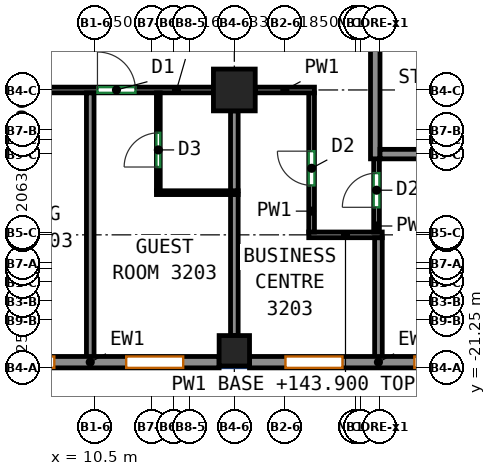
"""IFC4 building model, lengths in metres.
Left out: names, types, materials, properties, quantities, classifications, styles, units other than length and angle.
Written with IfcOpenShell. Run it as: python <this file> out.ifc"""

import sys

from ifc_helpers import new_model, si_unit, direction, frame, frame_2d, origin, origin_2d, place, context, subcontext, project, spatial, rectangle, extrude, source, transform, mapped, element, fill, save


model = new_model("IFC4")
c1 = context("Model", 3, precision=1e-05, world=origin(), true_north=direction((0.0, 1.0)))
c2 = subcontext(c1, "Body", "Model", "MODEL_VIEW")
j1 = project(units=[si_unit("LENGTHUNIT", "METRE"), si_unit("PLANEANGLEUNIT", "RADIAN")], contexts=[c1])
p1 = place(None, origin())
s1 = spatial("IfcSite", under=j1, at=p1, CompositionType="ELEMENT")
p2 = place(p1, origin())
s2 = spatial("IfcBuilding", under=s1, at=p2, CompositionType="ELEMENT")
p3 = place(p2, frame((0.0, 0.0, 143.9)))
s3 = spatial("IfcBuildingStorey", under=s2, at=p3, CompositionType="ELEMENT", Elevation=143.9)
m1 = source(origin(), c2, "Body", "SweptSolid", [
    extrude(rectangle(XDim=0.8, YDim=0.8, at=origin_2d()), origin(), (0.0, 0.0, 1.0), 3.12),
])
p4 = place(p3, frame((14.167, -20.8, 0.0), z_axis=(0.0, 0.0, 1.0), x_axis=(1.0, 0.0, 0.0)))
e1 = element("IfcColumn", 1, at=p4, inside=s3, PredefinedType="COLUMN", context=c2, shape_type="MappedRepresentation", body=[
    mapped(m1, transform((0.0, 0.0, 0.0))),
])
m2 = source(origin(), c2, "Body", "SweptSolid", [
    extrude(rectangle(XDim=1.1, YDim=1.1, at=origin_2d()), origin(), (0.0, 0.0, 1.0), 3.12),
])
p5 = place(p3, frame((14.167, -13.938, 0.0), z_axis=(0.0, 0.0, 1.0), x_axis=(1.0, 0.0, 0.0)))
e2 = element("IfcColumn", 2, at=p5, inside=s3, PredefinedType="COLUMN", context=c2, shape_type="MappedRepresentation", body=[
    mapped(m2, transform((0.0, 0.0, 0.0))),
])
m3 = source(origin(), c2, "Body", "SweptSolid", [
    extrude(rectangle(XDim=8.0, YDim=0.25, at=frame_2d((4.0, 0.0))), origin(), (0.0, 0.0, 1.0), 3.12),
])
p6 = place(p3, frame((17.875, -15.75, 0.0), z_axis=(0.0, 0.0, 1.0), x_axis=(0.0, 1.0, 0.0)))
e3 = element("IfcWall", 3, at=p6, inside=s3, PredefinedType="SHEAR", context=c2, shape_type="MappedRepresentation", body=[
    mapped(m3, transform((0.0, 0.0, 0.0))),
])
m4 = source(origin(), c2, "Body", "SweptSolid", [
    extrude(rectangle(XDim=3.7, YDim=0.25, at=frame_2d((1.85, 0.0))), origin(), (0.0, 0.0, 1.0), 3.12),
])
p7 = place(p3, frame((18.0, -15.625, 0.0), z_axis=(0.0, 0.0, 1.0), x_axis=(1.0, 0.0, 0.0)))
e4 = element("IfcWall", 4, at=p7, inside=s3, PredefinedType="SHEAR", context=c2, shape_type="MappedRepresentation", body=[
    mapped(m4, transform((0.0, 0.0, 0.0))),
])
m5 = source(origin(), c2, "Body", "SweptSolid", [
    extrude(rectangle(XDim=6.783, YDim=0.3, at=frame_2d((3.392, 0.0))), origin(), (0.0, 0.0, 1.0), 3.12),
])
p8 = place(p3, frame((6.983, -21.1, 0.0), z_axis=(0.0, 0.0, 1.0), x_axis=(1.0, 0.0, 0.0)))
e5 = element("IfcWall", 5, at=p8, inside=s3, PredefinedType="SOLIDWALL", context=c2, shape_type="MappedRepresentation", body=[
    mapped(m5, transform((0.0, 0.0, 0.0))),
])
p9 = place(p8, frame((0.946, 0.0, 0.85)))
e6 = element("IfcOpeningElement", 6, at=p9, cuts=e5, PredefinedType="OPENING", context=c2, shape_type="SweptSolid", body=[
    extrude(rectangle(XDim=1.5, YDim=1.95, at=frame_2d((0.75, 0.975))), frame((0.0, 0.16, 0.0), z_axis=(0.0, -1.0, 0.0), x_axis=(1.0, 0.0, 0.0)), (0.0, 0.0, 1.0), 0.32),
])
p10 = place(p8, frame((4.338, 0.0, 0.85)))
e7 = element("IfcOpeningElement", 7, at=p10, cuts=e5, PredefinedType="OPENING", context=c2, shape_type="SweptSolid", body=[
    extrude(rectangle(XDim=1.5, YDim=1.95, at=frame_2d((0.75, 0.975))), frame((0.0, 0.16, 0.0), z_axis=(0.0, -1.0, 0.0), x_axis=(1.0, 0.0, 0.0)), (0.0, 0.0, 1.0), 0.32),
])
m6 = source(origin(), c2, "Body", "SweptSolid", [
    extrude(rectangle(XDim=6.783, YDim=0.3, at=frame_2d((3.392, 0.0))), origin(), (0.0, 0.0, 1.0), 3.12),
])
p11 = place(p3, frame((14.567, -21.1, 0.0), z_axis=(0.0, 0.0, 1.0), x_axis=(1.0, 0.0, 0.0)))
e8 = element("IfcWall", 8, at=p11, inside=s3, PredefinedType="SOLIDWALL", context=c2, shape_type="MappedRepresentation", body=[
    mapped(m6, transform((0.0, 0.0, 0.0))),
])
p12 = place(p11, frame((0.946, 0.0, 0.85)))
e9 = element("IfcOpeningElement", 9, at=p12, cuts=e8, PredefinedType="OPENING", context=c2, shape_type="SweptSolid", body=[
    extrude(rectangle(XDim=1.5, YDim=1.95, at=frame_2d((0.75, 0.975))), frame((0.0, 0.16, 0.0), z_axis=(0.0, -1.0, 0.0), x_axis=(1.0, 0.0, 0.0)), (0.0, 0.0, 1.0), 0.32),
])
p13 = place(p11, frame((4.337, 0.0, 0.85)))
e10 = element("IfcOpeningElement", 10, at=p13, cuts=e8, PredefinedType="OPENING", context=c2, shape_type="SweptSolid", body=[
    extrude(rectangle(XDim=1.5, YDim=1.95, at=frame_2d((0.75, 0.975))), frame((0.0, 0.16, 0.0), z_axis=(0.0, -1.0, 0.0), x_axis=(1.0, 0.0, 0.0)), (0.0, 0.0, 1.0), 0.32),
])
p14 = place(p3, frame((7.133, -13.938, 0.0), z_axis=(0.0, 0.0, 1.0), x_axis=(1.0, 0.0, 0.0)))
e11 = element("IfcWall", 11, at=p14, inside=s3, PredefinedType="PARTITIONING", context=c2, shape_type="SweptSolid", body=[
    extrude(rectangle(XDim=6.484, YDim=0.15, at=frame_2d((3.242, 0.0))), origin(), (0.0, 0.0, 1.0), 3.12),
])
p15 = place(p14, frame((0.919, 0.0, 0.0)))
e12 = element("IfcOpeningElement", 12, at=p15, cuts=e11, PredefinedType="OPENING", context=c2, shape_type="SweptSolid", body=[
    extrude(rectangle(XDim=0.9, YDim=2.1, at=frame_2d((0.45, 1.05))), frame((0.0, 0.085, 0.0), z_axis=(0.0, -1.0, 0.0), x_axis=(1.0, 0.0, 0.0)), (0.0, 0.0, 1.0), 0.17),
])
p16 = place(p14, frame((3.432, 0.0, 0.0)))
e13 = element("IfcOpeningElement", 13, at=p16, cuts=e11, PredefinedType="OPENING", context=c2, shape_type="SweptSolid", body=[
    extrude(rectangle(XDim=1.0, YDim=2.1, at=frame_2d((0.5, 1.05))), frame((0.0, 0.085, 0.0), z_axis=(0.0, -1.0, 0.0), x_axis=(1.0, 0.0, 0.0)), (0.0, 0.0, 1.0), 0.17),
])
p17 = place(p3, frame((16.125, -17.75, 0.0), z_axis=(0.0, 0.0, 1.0), x_axis=(1.0, 0.0, 0.0)))
e14 = element("IfcWall", 14, at=p17, inside=s3, PredefinedType="PARTITIONING", context=c2, shape_type="SweptSolid", body=[
    extrude(rectangle(XDim=1.934, YDim=0.15, at=frame_2d((0.967, 0.0))), origin(), (0.0, 0.0, 1.0), 2.52),
])
p18 = place(p3, frame((16.2, -17.675, 0.0), z_axis=(0.0, 0.0, 1.0), x_axis=(0.0, 1.0, 0.0)))
e15 = element("IfcWall", 15, at=p18, inside=s3, PredefinedType="PARTITIONING", context=c2, shape_type="SweptSolid", body=[
    extrude(rectangle(XDim=3.662, YDim=0.15, at=frame_2d((1.831, 0.0))), origin(), (0.0, 0.0, 1.0), 3.12),
])
p19 = place(p18, frame((1.227, 0.0, 0.0)))
e16 = element("IfcOpeningElement", 16, at=p19, cuts=e15, PredefinedType="OPENING", context=c2, shape_type="SweptSolid", body=[
    extrude(rectangle(XDim=0.9, YDim=2.1, at=frame_2d((0.45, 1.05))), frame((0.0, 0.085, 0.0), z_axis=(0.0, -1.0, 0.0), x_axis=(1.0, 0.0, 0.0)), (0.0, 0.0, 1.0), 0.17),
])
p20 = place(p3, frame((14.717, -13.938, 0.0), z_axis=(0.0, 0.0, 1.0), x_axis=(1.0, 0.0, 0.0)))
e17 = element("IfcWall", 17, at=p20, inside=s3, PredefinedType="PARTITIONING", context=c2, shape_type="SweptSolid", body=[
    extrude(rectangle(XDim=1.558, YDim=0.15, at=frame_2d((0.779, 0.0))), origin(), (0.0, 0.0, 1.0), 3.12),
])
p21 = place(p3, frame((17.909, -17.675, 0.0), z_axis=(0.0, 0.0, 1.0), x_axis=(0.0, 1.0, 0.0)))
e18 = element("IfcWall", 18, at=p21, inside=s3, PredefinedType="PARTITIONING", context=c2, shape_type="SweptSolid", body=[
    extrude(rectangle(XDim=1.975, YDim=0.15, at=frame_2d((0.988, 0.0))), origin(), (0.0, 0.0, 1.0), 3.12),
])
p22 = place(p21, frame((0.65, 0.0, 0.0)))
e19 = element("IfcOpeningElement", 19, at=p22, cuts=e18, PredefinedType="OPENING", context=c2, shape_type="SweptSolid", body=[
    extrude(rectangle(XDim=0.9, YDim=2.1, at=frame_2d((0.45, 1.05))), frame((0.0, 0.085, 0.0), z_axis=(0.0, -1.0, 0.0), x_axis=(1.0, 0.0, 0.0)), (0.0, 0.0, 1.0), 0.17),
])
p23 = place(p3, frame((10.375, -21.0, 0.0), z_axis=(0.0, 0.0, 1.0), x_axis=(0.0, 1.0, 0.0)))
e20 = element("IfcWall", 20, at=p23, inside=s3, PredefinedType="PARTITIONING", context=c2, shape_type="SweptSolid", body=[
    extrude(rectangle(XDim=6.985, YDim=0.2, at=frame_2d((3.493, 0.0))), origin(), (0.0, 0.0, 1.0), 3.12),
])
p24 = place(p3, frame((12.167, -16.59, 0.0), z_axis=(0.0, 0.0, 1.0), x_axis=(0.0, 1.0, 0.0)))
e21 = element("IfcWall", 21, at=p24, inside=s3, PredefinedType="PARTITIONING", context=c2, shape_type="SweptSolid", body=[
    extrude(rectangle(XDim=2.575, YDim=0.1, at=frame_2d((1.288, 0.0))), origin(), (0.0, 0.0, 1.0), 3.12),
])
p25 = place(p24, frame((0.625, 0.0, 0.0)))
e22 = element("IfcOpeningElement", 22, at=p25, cuts=e21, PredefinedType="OPENING", context=c2, shape_type="SweptSolid", body=[
    extrude(rectangle(XDim=0.9, YDim=2.1, at=frame_2d((0.45, 1.05))), frame((0.0, 0.06, 0.0), z_axis=(0.0, -1.0, 0.0), x_axis=(1.0, 0.0, 0.0)), (0.0, 0.0, 1.0), 0.12),
])
p26 = place(p3, frame((12.117, -16.64, 0.0), z_axis=(0.0, 0.0, 1.0), x_axis=(1.0, 0.0, 0.0)))
e23 = element("IfcWall", 23, at=p26, inside=s3, PredefinedType="PARTITIONING", context=c2, shape_type="SweptSolid", body=[
    extrude(rectangle(XDim=2.15, YDim=0.1, at=frame_2d((1.075, 0.0))), origin(), (0.0, 0.0, 1.0), 3.12),
])
p27 = place(p3, frame((14.167, -20.4, 0.0), z_axis=(0.0, 0.0, 1.0), x_axis=(0.0, 1.0, 0.0)))
e24 = element("IfcWall", 24, at=p27, inside=s3, PredefinedType="PARTITIONING", context=c2, shape_type="SweptSolid", body=[
    extrude(rectangle(XDim=3.71, YDim=0.2, at=frame_2d((1.855, 0.0))), origin(), (0.0, 0.0, 1.0), 3.12),
])
p28 = place(p3, frame((14.167, -16.59, 0.0), z_axis=(0.0, 0.0, 1.0), x_axis=(0.0, 1.0, 0.0)))
e25 = element("IfcWall", 25, at=p28, inside=s3, PredefinedType="PARTITIONING", context=c2, shape_type="SweptSolid", body=[
    extrude(rectangle(XDim=2.102, YDim=0.2, at=frame_2d((1.051, 0.0))), origin(), (0.0, 0.0, 1.0), 3.12),
])
p29 = place(p3, frame((17.959, -21.0, 0.0), z_axis=(0.0, 0.0, 1.0), x_axis=(0.0, 1.0, 0.0)))
e26 = element("IfcWall", 26, at=p29, inside=s3, PredefinedType="PARTITIONING", context=c2, shape_type="SweptSolid", body=[
    extrude(rectangle(XDim=3.173, YDim=0.2, at=frame_2d((1.586, 0.0))), origin(), (0.0, 0.0, 1.0), 3.12),
])
p30 = place(p9, origin())
e27 = element("IfcWindow", 27, at=p30, inside=s3, PartitioningType="SINGLE_PANEL", PredefinedType="WINDOW", context=c2, shape_type="SweptSolid", body=[
    extrude(rectangle(XDim=1.5, YDim=1.95, at=frame_2d((0.75, 0.975))), frame((0.0, 0.03, 0.0), z_axis=(0.0, -1.0, 0.0), x_axis=(1.0, 0.0, 0.0)), (0.0, 0.0, 1.0), 0.06),
])
fill(e6, e27)
p31 = place(p10, origin())
e28 = element("IfcWindow", 28, at=p31, inside=s3, PartitioningType="SINGLE_PANEL", PredefinedType="WINDOW", context=c2, shape_type="SweptSolid", body=[
    extrude(rectangle(XDim=1.5, YDim=1.95, at=frame_2d((0.75, 0.975))), frame((0.0, 0.03, 0.0), z_axis=(0.0, -1.0, 0.0), x_axis=(1.0, 0.0, 0.0)), (0.0, 0.0, 1.0), 0.06),
])
fill(e7, e28)
p32 = place(p12, origin())
e29 = element("IfcWindow", 29, at=p32, inside=s3, PartitioningType="SINGLE_PANEL", PredefinedType="WINDOW", context=c2, shape_type="SweptSolid", body=[
    extrude(rectangle(XDim=1.5, YDim=1.95, at=frame_2d((0.75, 0.975))), frame((0.0, 0.03, 0.0), z_axis=(0.0, -1.0, 0.0), x_axis=(1.0, 0.0, 0.0)), (0.0, 0.0, 1.0), 0.06),
])
fill(e9, e29)
p33 = place(p13, origin())
e30 = element("IfcWindow", 30, at=p33, inside=s3, PartitioningType="SINGLE_PANEL", PredefinedType="WINDOW", context=c2, shape_type="SweptSolid", body=[
    extrude(rectangle(XDim=1.5, YDim=1.95, at=frame_2d((0.75, 0.975))), frame((0.0, 0.03, 0.0), z_axis=(0.0, -1.0, 0.0), x_axis=(1.0, 0.0, 0.0)), (0.0, 0.0, 1.0), 0.06),
])
fill(e10, e30)
p34 = place(p22, origin())
e31 = element("IfcDoor", 31, at=p34, inside=s3, OperationType="SINGLE_SWING_LEFT", PredefinedType="DOOR", context=c2, shape_type="SweptSolid", body=[
    extrude(rectangle(XDim=0.9, YDim=2.1, at=frame_2d((0.45, 1.05))), frame((0.0, 0.025, 0.0), z_axis=(0.0, -1.0, 0.0), x_axis=(1.0, 0.0, 0.0)), (0.0, 0.0, 1.0), 0.05),
])
fill(e19, e31)
p35 = place(p19, origin())
e32 = element("IfcDoor", 32, at=p35, inside=s3, OperationType="SINGLE_SWING_RIGHT", PredefinedType="DOOR", context=c2, shape_type="SweptSolid", body=[
    extrude(rectangle(XDim=0.9, YDim=2.1, at=frame_2d((0.45, 1.05))), frame((0.0, 0.025, 0.0), z_axis=(0.0, -1.0, 0.0), x_axis=(1.0, 0.0, 0.0)), (0.0, 0.0, 1.0), 0.05),
])
fill(e16, e32)
p36 = place(p25, origin())
e33 = element("IfcDoor", 33, at=p36, inside=s3, OperationType="SINGLE_SWING_LEFT", PredefinedType="DOOR", context=c2, shape_type="SweptSolid", body=[
    extrude(rectangle(XDim=0.9, YDim=2.1, at=frame_2d((0.45, 1.05))), frame((0.0, 0.025, 0.0), z_axis=(0.0, -1.0, 0.0), x_axis=(1.0, 0.0, 0.0)), (0.0, 0.0, 1.0), 0.05),
])
fill(e22, e33)
p37 = place(p16, origin())
e34 = element("IfcDoor", 34, at=p37, inside=s3, OperationType="SINGLE_SWING_LEFT", PredefinedType="DOOR", context=c2, shape_type="SweptSolid", body=[
    extrude(rectangle(XDim=1.0, YDim=2.1, at=frame_2d((0.5, 1.05))), frame((0.0, 0.025, 0.0), z_axis=(0.0, -1.0, 0.0), x_axis=(1.0, 0.0, 0.0)), (0.0, 0.0, 1.0), 0.05),
])
fill(e13, e34)
save(model, sys.argv[1])
